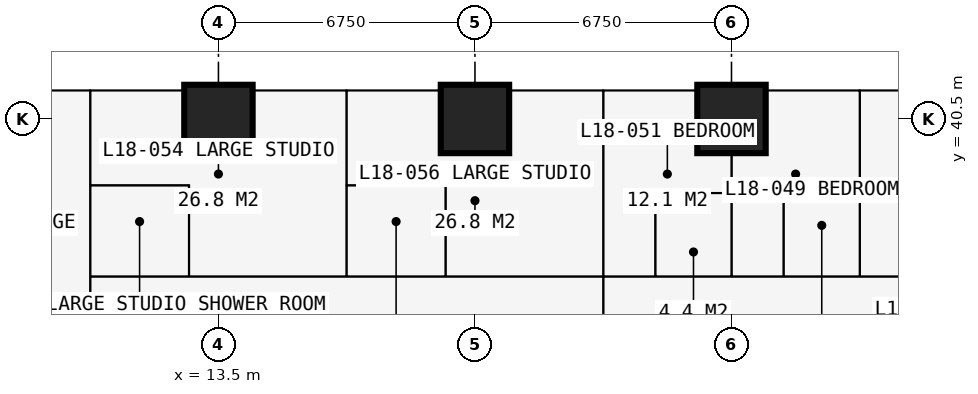
"""IFC4 building model, lengths in metres.
Left out: names, types, materials, properties, quantities, classifications, styles, units other than length and angle.
Written with IfcOpenShell. Run it as: python <this file> out.ifc"""

import sys

from ifc_helpers import new_model, si_unit, direction, frame, frame_2d, origin, origin_2d, place, context, subcontext, project, spatial, rectangle, extrude, element, fill, save


model = new_model("IFC4")
c1 = context("Model", 3, precision=1e-05, world=origin(), true_north=direction((0.0, 1.0)))
c2 = subcontext(c1, "Body", "Model", "MODEL_VIEW")
j1 = project(units=[si_unit("LENGTHUNIT", "METRE"), si_unit("PLANEANGLEUNIT", "RADIAN")], contexts=[c1])
p1 = place(None, origin())
s1 = spatial("IfcSite", under=j1, at=p1, CompositionType="ELEMENT")
p2 = place(p1, origin())
s2 = spatial("IfcBuilding", under=s1, at=p2, CompositionType="ELEMENT")
p3 = place(p2, frame((0.0, 0.0, 68.4)))
s3 = spatial("IfcBuildingStorey", under=s2, at=p3, CompositionType="ELEMENT", Elevation=68.4)
for number, where, z_axis, x_axis in (
    (1, (13.5, 40.5, 0.0), (0.0, 0.0, 1.0), (1.0, 0.0, 0.0)),
    (2, (20.25, 40.5, 0.0), (0.0, 0.0, 1.0), (1.0, 0.0, 0.0)),
    (3, (27.0, 40.5, 0.0), (0.0, 0.0, 1.0), (1.0, 0.0, 0.0)),
):
    element("IfcColumn", number, at=place(p3, frame(where, z_axis=z_axis, x_axis=x_axis)), inside=s3, PredefinedType="COLUMN", context=c2, shape_type="SweptSolid", body=[
        extrude(rectangle(XDim=1.8, YDim=1.8, at=origin_2d()), origin(), (0.0, 0.0, 1.0), 3.6),
    ])
p4 = place(p3, frame((13.5, 41.25, 0.0), z_axis=(0.0, 0.0, 1.0), x_axis=(1.0, 0.0, 0.0)))
e4 = element("IfcWall", 4, at=p4, inside=s3, PredefinedType="SOLIDWALL", context=c2, shape_type="SweptSolid", body=[
    extrude(rectangle(XDim=6.75, YDim=0.15, at=frame_2d((3.375, 0.0))), origin(), (0.0, 0.0, 1.0), 3.375),
])
p5 = place(p4, frame((0.962, 0.0, 0.0)))
e5 = element("IfcOpeningElement", 5, at=p5, cuts=e4, PredefinedType="OPENING", context=c2, shape_type="SweptSolid", body=[
    extrude(rectangle(XDim=1.0, YDim=2.2, at=frame_2d((0.5, 1.1))), frame((0.0, 0.085, 0.0), z_axis=(0.0, -1.0, 0.0), x_axis=(1.0, 0.0, 0.0)), (0.0, 0.0, 1.0), 0.17),
])
p6 = place(p4, frame((2.025, 0.0, 0.9)))
e6 = element("IfcOpeningElement", 6, at=p6, cuts=e4, PredefinedType="OPENING", context=c2, shape_type="SweptSolid", body=[
    extrude(rectangle(XDim=1.2, YDim=1.8, at=frame_2d((0.6, 0.9))), frame((0.0, 0.085, 0.0), z_axis=(0.0, -1.0, 0.0), x_axis=(1.0, 0.0, 0.0)), (0.0, 0.0, 1.0), 0.17),
])
p7 = place(p4, frame((4.788, 0.0, 0.0)))
e7 = element("IfcOpeningElement", 7, at=p7, cuts=e4, PredefinedType="OPENING", context=c2, shape_type="SweptSolid", body=[
    extrude(rectangle(XDim=1.0, YDim=2.2, at=frame_2d((0.5, 1.1))), frame((0.0, 0.085, 0.0), z_axis=(0.0, -1.0, 0.0), x_axis=(1.0, 0.0, 0.0)), (0.0, 0.0, 1.0), 0.17),
])
p8 = place(p4, frame((3.525, 0.0, 0.9)))
e8 = element("IfcOpeningElement", 8, at=p8, cuts=e4, PredefinedType="OPENING", context=c2, shape_type="SweptSolid", body=[
    extrude(rectangle(XDim=1.2, YDim=1.8, at=frame_2d((0.6, 0.9))), frame((0.0, 0.085, 0.0), z_axis=(0.0, -1.0, 0.0), x_axis=(1.0, 0.0, 0.0)), (0.0, 0.0, 1.0), 0.17),
])
p9 = place(p3, frame((16.875, 41.35, 0.0), z_axis=(0.0, 0.0, 1.0), x_axis=(0.0, 1.0, 0.0)))
e9 = element("IfcWall", 9, at=p9, inside=s3, PredefinedType="USERDEFINED", context=c2, shape_type="SweptSolid", body=[
    extrude(rectangle(XDim=2.2, YDim=1.0, at=frame_2d((1.1, 0.0))), origin(), (0.0, 0.0, 1.0), 0.9),
])
p10 = place(p3, frame((10.125, 30.375, 0.0), z_axis=(0.0, 0.0, 1.0), x_axis=(0.0, 1.0, 0.0)))
e10 = element("IfcWall", 10, at=p10, inside=s3, PredefinedType="PARTITIONING", context=c2, shape_type="SweptSolid", body=[
    extrude(rectangle(XDim=10.859, YDim=0.15, at=frame_2d((5.429, 0.0))), origin(), (0.0, 0.0, 1.0), 3.375),
])
p11 = place(p3, frame((10.125, 36.35, 0.0), z_axis=(0.0, 0.0, 1.0), x_axis=(1.0, 0.0, 0.0)))
e11 = element("IfcWall", 11, at=p11, inside=s3, PredefinedType="PARTITIONING", context=c2, shape_type="SweptSolid", body=[
    extrude(rectangle(XDim=23.625, YDim=0.15, at=frame_2d((11.812, 0.0))), origin(), (0.0, 0.0, 1.0), 3.375),
])
p12 = place(p11, frame((21.45, 0.0, 0.0)))
e12 = element("IfcOpeningElement", 12, at=p12, cuts=e11, PredefinedType="OPENING", context=c2, shape_type="SweptSolid", body=[
    extrude(rectangle(XDim=1.0, YDim=2.2, at=frame_2d((0.5, 1.1))), frame((0.0, 0.085, 0.0), z_axis=(0.0, -1.0, 0.0), x_axis=(1.0, 0.0, 0.0)), (0.0, 0.0, 1.0), 0.17),
])
p13 = place(p11, frame((17.125, 0.0, 0.0)))
e13 = element("IfcOpeningElement", 13, at=p13, cuts=e11, PredefinedType="OPENING", context=c2, shape_type="SweptSolid", body=[
    extrude(rectangle(XDim=0.95, YDim=2.2, at=frame_2d((0.475, 1.1))), frame((0.0, 0.085, 0.0), z_axis=(0.0, -1.0, 0.0), x_axis=(1.0, 0.0, 0.0)), (0.0, 0.0, 1.0), 0.17),
])
p14 = place(p11, frame((13.7, 0.0, 0.0)))
e14 = element("IfcOpeningElement", 14, at=p14, cuts=e11, PredefinedType="OPENING", context=c2, shape_type="SweptSolid", body=[
    extrude(rectangle(XDim=0.95, YDim=2.2, at=frame_2d((0.475, 1.1))), frame((0.0, 0.085, 0.0), z_axis=(0.0, -1.0, 0.0), x_axis=(1.0, 0.0, 0.0)), (0.0, 0.0, 1.0), 0.17),
])
p15 = place(p11, frame((4.2, 0.0, 0.0)))
e15 = element("IfcOpeningElement", 15, at=p15, cuts=e11, PredefinedType="OPENING", context=c2, shape_type="SweptSolid", body=[
    extrude(rectangle(XDim=0.95, YDim=2.2, at=frame_2d((0.475, 1.1))), frame((0.0, 0.085, 0.0), z_axis=(0.0, -1.0, 0.0), x_axis=(1.0, 0.0, 0.0)), (0.0, 0.0, 1.0), 0.17),
])
p16 = place(p11, frame((10.95, 0.0, 0.0)))
e16 = element("IfcOpeningElement", 16, at=p16, cuts=e11, PredefinedType="OPENING", context=c2, shape_type="SweptSolid", body=[
    extrude(rectangle(XDim=0.95, YDim=2.2, at=frame_2d((0.475, 1.1))), frame((0.0, 0.085, 0.0), z_axis=(0.0, -1.0, 0.0), x_axis=(1.0, 0.0, 0.0)), (0.0, 0.0, 1.0), 0.17),
])
p17 = place(p3, frame((10.125, 38.75, 0.0), z_axis=(0.0, 0.0, 1.0), x_axis=(1.0, 0.0, 0.0)))
e17 = element("IfcWall", 17, at=p17, inside=s3, PredefinedType="PARTITIONING", context=c2, shape_type="SweptSolid", body=[
    extrude(rectangle(XDim=2.6, YDim=0.1, at=frame_2d((1.3, 0.0))), origin(), (0.0, 0.0, 1.0), 3.375),
])
p18 = place(p17, frame((0.85, 0.0, 0.0)))
e18 = element("IfcOpeningElement", 18, at=p18, cuts=e17, PredefinedType="OPENING", context=c2, shape_type="SweptSolid", body=[
    extrude(rectangle(XDim=0.9, YDim=2.2, at=frame_2d((0.45, 1.1))), frame((0.0, 0.06, 0.0), z_axis=(0.0, -1.0, 0.0), x_axis=(1.0, 0.0, 0.0)), (0.0, 0.0, 1.0), 0.12),
])
p19 = place(p3, frame((12.725, 36.35, 0.0), z_axis=(0.0, 0.0, 1.0), x_axis=(0.0, 1.0, 0.0)))
e19 = element("IfcWall", 19, at=p19, inside=s3, PredefinedType="PARTITIONING", context=c2, shape_type="SweptSolid", body=[
    extrude(rectangle(XDim=2.4, YDim=0.1, at=frame_2d((1.2, 0.0))), origin(), (0.0, 0.0, 1.0), 3.375),
])
p20 = place(p3, frame((16.875, 36.35, 0.0), z_axis=(0.0, 0.0, 1.0), x_axis=(0.0, 1.0, 0.0)))
e20 = element("IfcWall", 20, at=p20, inside=s3, PredefinedType="PARTITIONING", context=c2, shape_type="SweptSolid", body=[
    extrude(rectangle(XDim=4.884, YDim=0.175, at=frame_2d((2.442, 0.0))), origin(), (0.0, 0.0, 1.0), 3.375),
])
p21 = place(p20, frame((0.75, 0.0, 0.0)))
e21 = element("IfcOpeningElement", 21, at=p21, cuts=e20, PredefinedType="OPENING", context=c2, shape_type="SweptSolid", body=[
    extrude(rectangle(XDim=0.9, YDim=2.2, at=frame_2d((0.45, 1.1))), frame((0.0, 0.097, 0.0), z_axis=(0.0, -1.0, 0.0), x_axis=(1.0, 0.0, 0.0)), (0.0, 0.0, 1.0), 0.195),
])
p22 = place(p3, frame((16.875, 38.75, 0.0), z_axis=(0.0, 0.0, 1.0), x_axis=(1.0, 0.0, 0.0)))
e22 = element("IfcWall", 22, at=p22, inside=s3, PredefinedType="PARTITIONING", context=c2, shape_type="SweptSolid", body=[
    extrude(rectangle(XDim=2.6, YDim=0.1, at=frame_2d((1.3, 0.0))), origin(), (0.0, 0.0, 1.0), 3.375),
])
p23 = place(p3, frame((19.475, 36.35, 0.0), z_axis=(0.0, 0.0, 1.0), x_axis=(0.0, 1.0, 0.0)))
e23 = element("IfcWall", 23, at=p23, inside=s3, PredefinedType="PARTITIONING", context=c2, shape_type="SweptSolid", body=[
    extrude(rectangle(XDim=2.4, YDim=0.1, at=frame_2d((1.2, 0.0))), origin(), (0.0, 0.0, 1.0), 3.375),
])
p24 = place(p3, frame((23.625, 29.2, 0.0), z_axis=(0.0, 0.0, 1.0), x_axis=(0.0, 1.0, 0.0)))
e24 = element("IfcWall", 24, at=p24, inside=s3, PredefinedType="PARTITIONING", context=c2, shape_type="SweptSolid", body=[
    extrude(rectangle(XDim=12.034, YDim=0.15, at=frame_2d((6.017, 0.0))), origin(), (0.0, 0.0, 1.0), 3.375),
])
p25 = place(p3, frame((25.0, 36.35, 0.0), z_axis=(0.0, 0.0, 1.0), x_axis=(0.0, 1.0, 0.0)))
e25 = element("IfcWall", 25, at=p25, inside=s3, PredefinedType="PARTITIONING", context=c2, shape_type="SweptSolid", body=[
    extrude(rectangle(XDim=2.2, YDim=0.1, at=frame_2d((1.1, 0.0))), origin(), (0.0, 0.0, 1.0), 3.375),
])
p26 = place(p3, frame((25.0, 38.55, 0.0), z_axis=(0.0, 0.0, 1.0), x_axis=(1.0, 0.0, 0.0)))
e26 = element("IfcWall", 26, at=p26, inside=s3, PredefinedType="PARTITIONING", context=c2, shape_type="SweptSolid", body=[
    extrude(rectangle(XDim=2.0, YDim=0.1, at=frame_2d((1.0, 0.0))), origin(), (0.0, 0.0, 1.0), 3.375),
])
p27 = place(p3, frame((27.0, 36.35, 0.0), z_axis=(0.0, 0.0, 1.0), x_axis=(0.0, 1.0, 0.0)))
e27 = element("IfcWall", 27, at=p27, inside=s3, PredefinedType="PARTITIONING", context=c2, shape_type="SweptSolid", body=[
    extrude(rectangle(XDim=4.884, YDim=0.175, at=frame_2d((2.442, 0.0))), origin(), (0.0, 0.0, 1.0), 2.61),
])
p28 = place(p27, frame((0.65, 0.0, 0.0)))
e28 = element("IfcOpeningElement", 28, at=p28, cuts=e27, PredefinedType="OPENING", context=c2, shape_type="SweptSolid", body=[
    extrude(rectangle(XDim=0.9, YDim=2.2, at=frame_2d((0.45, 1.1))), frame((0.0, 0.097, 0.0), z_axis=(0.0, -1.0, 0.0), x_axis=(1.0, 0.0, 0.0)), (0.0, 0.0, 1.0), 0.195),
])
p29 = place(p3, frame((28.375, 36.35, 0.0), z_axis=(0.0, 0.0, 1.0), x_axis=(0.0, 1.0, 0.0)))
e29 = element("IfcWall", 29, at=p29, inside=s3, PredefinedType="PARTITIONING", context=c2, shape_type="SweptSolid", body=[
    extrude(rectangle(XDim=2.2, YDim=0.1, at=frame_2d((1.1, 0.0))), origin(), (0.0, 0.0, 1.0), 3.375),
])
p30 = place(p29, frame((0.65, 0.0, 0.0)))
e30 = element("IfcOpeningElement", 30, at=p30, cuts=e29, PredefinedType="OPENING", context=c2, shape_type="SweptSolid", body=[
    extrude(rectangle(XDim=0.9, YDim=2.2, at=frame_2d((0.45, 1.1))), frame((0.0, 0.06, 0.0), z_axis=(0.0, -1.0, 0.0), x_axis=(1.0, 0.0, 0.0)), (0.0, 0.0, 1.0), 0.12),
])
p31 = place(p3, frame((28.375, 38.55, 0.0), z_axis=(0.0, 0.0, 1.0), x_axis=(1.0, 0.0, 0.0)))
e31 = element("IfcWall", 31, at=p31, inside=s3, PredefinedType="PARTITIONING", context=c2, shape_type="SweptSolid", body=[
    extrude(rectangle(XDim=2.0, YDim=0.1, at=frame_2d((1.0, 0.0))), origin(), (0.0, 0.0, 1.0), 3.375),
])
p32 = place(p3, frame((30.375, 36.35, 0.0), z_axis=(0.0, 0.0, 1.0), x_axis=(0.0, 1.0, 0.0)))
e32 = element("IfcWall", 32, at=p32, inside=s3, PredefinedType="PARTITIONING", context=c2, shape_type="SweptSolid", body=[
    extrude(rectangle(XDim=4.884, YDim=0.15, at=frame_2d((2.442, 0.0))), origin(), (0.0, 0.0, 1.0), 3.375),
])
p33 = place(p5, origin())
e33 = element("IfcDoor", 33, at=p33, inside=s3, OperationType="SINGLE_SWING_LEFT", PredefinedType="DOOR", context=c2, shape_type="SweptSolid", body=[
    extrude(rectangle(XDim=1.0, YDim=2.2, at=frame_2d((0.5, 1.1))), frame((0.0, 0.025, 0.0), z_axis=(0.0, -1.0, 0.0), x_axis=(1.0, 0.0, 0.0)), (0.0, 0.0, 1.0), 0.05),
])
fill(e5, e33)
p34 = place(p6, origin())
e34 = element("IfcWindow", 34, at=p34, inside=s3, PartitioningType="SINGLE_PANEL", PredefinedType="WINDOW", context=c2, shape_type="SweptSolid", body=[
    extrude(rectangle(XDim=1.2, YDim=1.8, at=frame_2d((0.6, 0.9))), frame((0.0, 0.03, 0.0), z_axis=(0.0, -1.0, 0.0), x_axis=(1.0, 0.0, 0.0)), (0.0, 0.0, 1.0), 0.06),
])
fill(e6, e34)
p35 = place(p7, origin())
e35 = element("IfcDoor", 35, at=p35, inside=s3, OperationType="SINGLE_SWING_RIGHT", PredefinedType="DOOR", context=c2, shape_type="SweptSolid", body=[
    extrude(rectangle(XDim=1.0, YDim=2.2, at=frame_2d((0.5, 1.1))), frame((0.0, 0.025, 0.0), z_axis=(0.0, -1.0, 0.0), x_axis=(1.0, 0.0, 0.0)), (0.0, 0.0, 1.0), 0.05),
])
fill(e7, e35)
p36 = place(p8, origin())
e36 = element("IfcWindow", 36, at=p36, inside=s3, PartitioningType="SINGLE_PANEL", PredefinedType="WINDOW", context=c2, shape_type="SweptSolid", body=[
    extrude(rectangle(XDim=1.2, YDim=1.8, at=frame_2d((0.6, 0.9))), frame((0.0, 0.03, 0.0), z_axis=(0.0, -1.0, 0.0), x_axis=(1.0, 0.0, 0.0)), (0.0, 0.0, 1.0), 0.06),
])
fill(e8, e36)
p37 = place(p13, origin())
e37 = element("IfcDoor", 37, at=p37, inside=s3, OperationType="SINGLE_SWING_LEFT", PredefinedType="DOOR", context=c2, shape_type="SweptSolid", body=[
    extrude(rectangle(XDim=0.95, YDim=2.2, at=frame_2d((0.475, 1.1))), frame((0.0, 0.025, 0.0), z_axis=(0.0, -1.0, 0.0), x_axis=(1.0, 0.0, 0.0)), (0.0, 0.0, 1.0), 0.05),
])
fill(e13, e37)
p38 = place(p30, origin())
e38 = element("IfcDoor", 38, at=p38, inside=s3, OperationType="SINGLE_SWING_RIGHT", PredefinedType="DOOR", context=c2, shape_type="SweptSolid", body=[
    extrude(rectangle(XDim=0.9, YDim=2.2, at=frame_2d((0.45, 1.1))), frame((0.0, 0.025, 0.0), z_axis=(0.0, -1.0, 0.0), x_axis=(1.0, 0.0, 0.0)), (0.0, 0.0, 1.0), 0.05),
])
fill(e30, e38)
p39 = place(p14, origin())
e39 = element("IfcDoor", 39, at=p39, inside=s3, OperationType="SINGLE_SWING_LEFT", PredefinedType="DOOR", context=c2, shape_type="SweptSolid", body=[
    extrude(rectangle(XDim=0.95, YDim=2.2, at=frame_2d((0.475, 1.1))), frame((0.0, 0.025, 0.0), z_axis=(0.0, -1.0, 0.0), x_axis=(1.0, 0.0, 0.0)), (0.0, 0.0, 1.0), 0.05),
])
fill(e14, e39)
p40 = place(p28, origin())
e40 = element("IfcDoor", 40, at=p40, inside=s3, OperationType="SINGLE_SWING_RIGHT", PredefinedType="DOOR", context=c2, shape_type="SweptSolid", body=[
    extrude(rectangle(XDim=0.9, YDim=2.2, at=frame_2d((0.45, 1.1))), frame((0.0, 0.025, 0.0), z_axis=(0.0, -1.0, 0.0), x_axis=(1.0, 0.0, 0.0)), (0.0, 0.0, 1.0), 0.05),
])
fill(e28, e40)
p41 = place(p15, origin())
e41 = element("IfcDoor", 41, at=p41, inside=s3, OperationType="SINGLE_SWING_LEFT", PredefinedType="DOOR", context=c2, shape_type="SweptSolid", body=[
    extrude(rectangle(XDim=0.95, YDim=2.2, at=frame_2d((0.475, 1.1))), frame((0.0, 0.025, 0.0), z_axis=(0.0, -1.0, 0.0), x_axis=(1.0, 0.0, 0.0)), (0.0, 0.0, 1.0), 0.05),
])
fill(e15, e41)
p42 = place(p18, origin())
e42 = element("IfcDoor", 42, at=p42, inside=s3, OperationType="SINGLE_SWING_RIGHT", PredefinedType="DOOR", context=c2, shape_type="SweptSolid", body=[
    extrude(rectangle(XDim=0.9, YDim=2.2, at=frame_2d((0.45, 1.1))), frame((0.0, 0.025, 0.0), z_axis=(0.0, -1.0, 0.0), x_axis=(1.0, 0.0, 0.0)), (0.0, 0.0, 1.0), 0.05),
])
fill(e18, e42)
p43 = place(p16, origin())
e43 = element("IfcDoor", 43, at=p43, inside=s3, OperationType="SINGLE_SWING_LEFT", PredefinedType="DOOR", context=c2, shape_type="SweptSolid", body=[
    extrude(rectangle(XDim=0.95, YDim=2.2, at=frame_2d((0.475, 1.1))), frame((0.0, 0.025, 0.0), z_axis=(0.0, -1.0, 0.0), x_axis=(1.0, 0.0, 0.0)), (0.0, 0.0, 1.0), 0.05),
])
fill(e16, e43)
p44 = place(p21, origin())
e44 = element("IfcDoor", 44, at=p44, inside=s3, OperationType="SINGLE_SWING_RIGHT", PredefinedType="DOOR", context=c2, shape_type="SweptSolid", body=[
    extrude(rectangle(XDim=0.9, YDim=2.2, at=frame_2d((0.45, 1.1))), frame((0.0, 0.025, 0.0), z_axis=(0.0, -1.0, 0.0), x_axis=(1.0, 0.0, 0.0)), (0.0, 0.0, 1.0), 0.05),
])
fill(e21, e44)
save(model, sys.argv[1])
